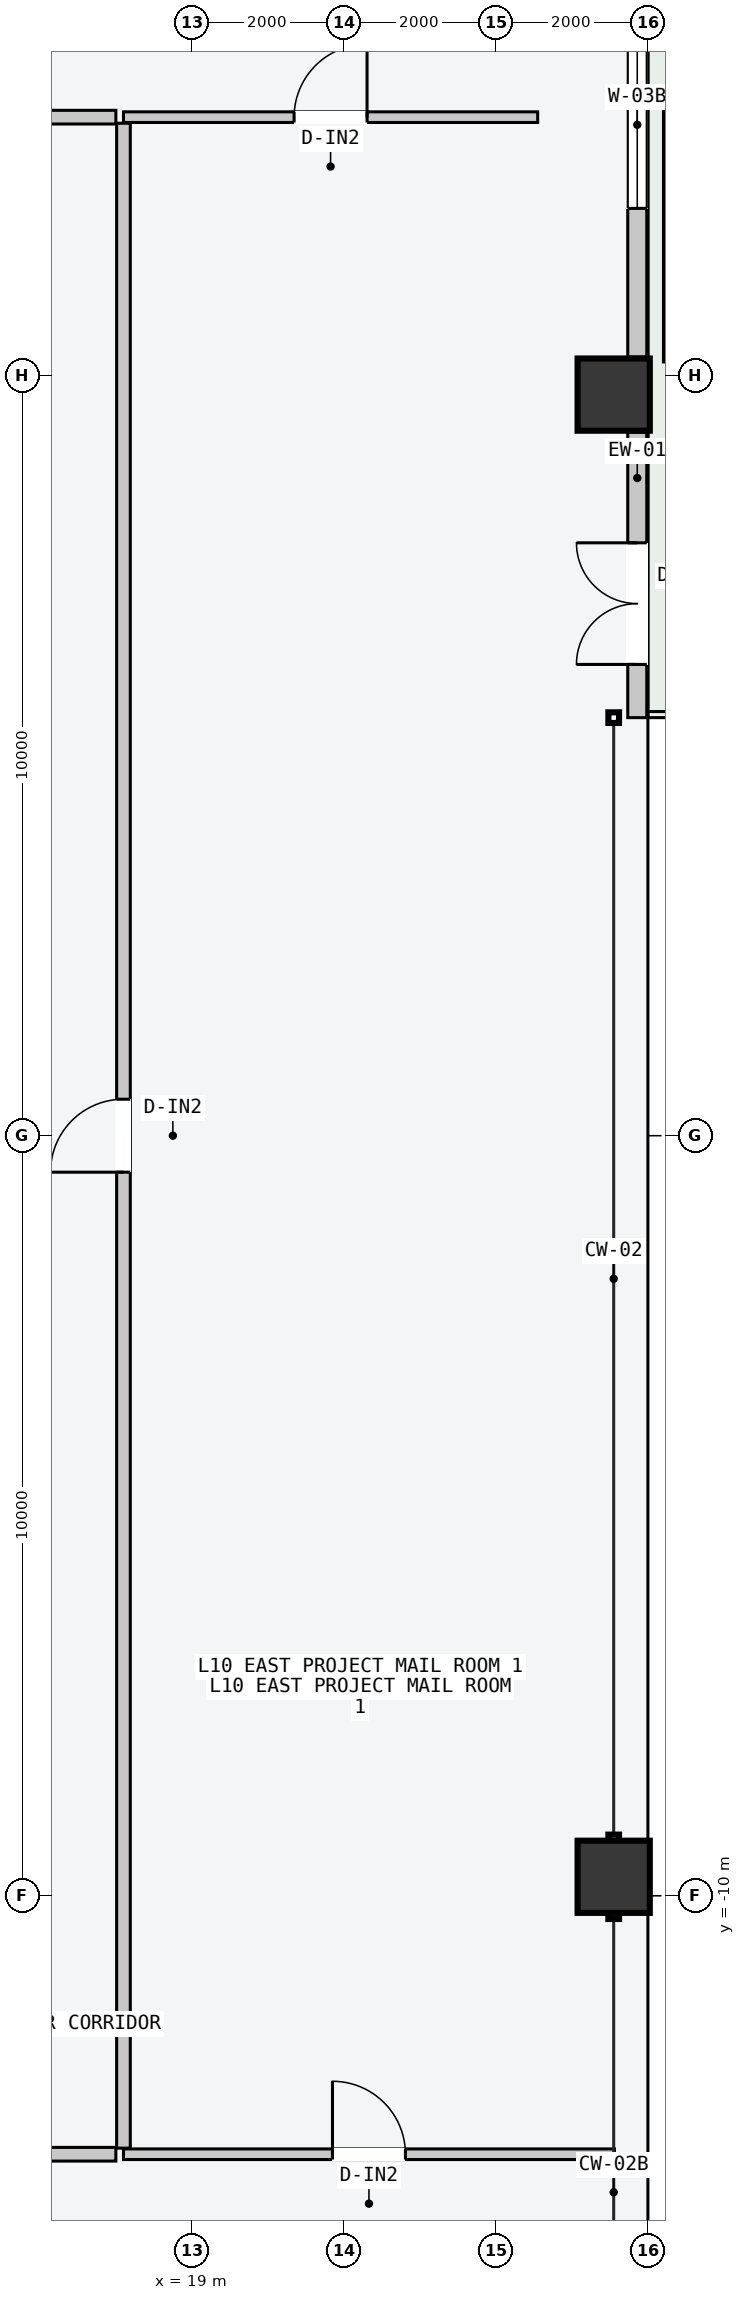
"""IFC4 building model, lengths in metres.
Left out: names, types, materials, properties, quantities, classifications, styles, units other than length and angle.
Written with IfcOpenShell. Run it as: python <this file> out.ifc"""

import sys

from ifc_helpers import new_model, si_unit, direction, frame, frame_2d, origin, origin_2d, place, context, subcontext, project, spatial, rectangle, hollow_rectangle, extrude, element, fill, save


model = new_model("IFC4")
c1 = context("Model", 3, precision=1e-05, world=origin(), true_north=direction((0.0, 1.0)))
c2 = subcontext(c1, "Body", "Model", "MODEL_VIEW")
j1 = project(units=[si_unit("LENGTHUNIT", "METRE"), si_unit("PLANEANGLEUNIT", "RADIAN")], contexts=[c1])
p1 = place(None, origin())
s1 = spatial("IfcSite", under=j1, at=p1, CompositionType="ELEMENT")
p2 = place(p1, origin())
s2 = spatial("IfcBuilding", under=s1, at=p2, CompositionType="ELEMENT")
p3 = place(p2, frame((0.0, 0.0, 42.0)))
s3 = spatial("IfcBuildingStorey", under=s2, at=p3, CompositionType="ELEMENT", Elevation=42.0)
for number, where, z_axis, x_axis in (
    (1, (24.55, -9.75, 0.0), (0.0, 0.0, 1.0), (0.0, 1.0, 0.0)),
    (2, (24.55, 9.75, 0.0), (0.0, 0.0, 1.0), (0.0, 1.0, 0.0)),
):
    element("IfcColumn", number, at=place(p3, frame(where, z_axis=z_axis, x_axis=x_axis)), inside=s3, PredefinedType="COLUMN", context=c2, shape_type="SweptSolid", body=[
        extrude(hollow_rectangle(XDim=0.95, YDim=0.95, WallThickness=0.048, at=origin_2d()), origin(), (0.0, 0.0, 1.0), 3.6),
    ])
p4 = place(p3, frame((24.86, 5.5, 0.0), z_axis=(0.0, 0.0, 1.0), x_axis=(0.0, 1.0, 0.0)))
e3 = element("IfcWall", 3, at=p4, inside=s3, PredefinedType="STANDARD", context=c2, shape_type="SweptSolid", body=[
    extrude(rectangle(XDim=3.755, YDim=0.25, at=frame_2d((1.877, 0.0))), origin(), (0.0, 0.0, 1.0), 3.4),
])
p5 = place(p4, frame((0.7, 0.0, 0.0)))
e4 = element("IfcOpeningElement", 4, at=p5, cuts=e3, PredefinedType="OPENING", context=c2, shape_type="SweptSolid", body=[
    extrude(rectangle(XDim=1.6, YDim=2.2, at=frame_2d((0.8, 1.1))), frame((0.0, 0.135, 0.0), z_axis=(0.0, -1.0, 0.0), x_axis=(1.0, 0.0, 0.0)), (0.0, 0.0, 1.0), 0.27),
])
p6 = place(p3, frame((24.86, 10.245, 0.0), z_axis=(0.0, 0.0, 1.0), x_axis=(0.0, 1.0, 0.0)))
e5 = element("IfcWall", 5, at=p6, inside=s3, PredefinedType="STANDARD", context=c2, shape_type="SweptSolid", body=[
    extrude(rectangle(XDim=7.31, YDim=0.25, at=frame_2d((3.655, 0.0))), origin(), (0.0, 0.0, 1.0), 3.4),
])
p7 = place(p6, frame((1.955, 0.0, 0.85)))
e6 = element("IfcOpeningElement", 6, at=p7, cuts=e5, PredefinedType="OPENING", context=c2, shape_type="SweptSolid", body=[
    extrude(rectangle(XDim=2.2, YDim=2.1, at=frame_2d((1.1, 1.05))), frame((0.0, 0.135, 0.0), z_axis=(0.0, -1.0, 0.0), x_axis=(1.0, 0.0, 0.0)), (0.0, 0.0, 1.0), 0.27),
])
p8 = place(p3, frame((-18.0, 13.4, 0.0), z_axis=(0.0, 0.0, 1.0), x_axis=(1.0, 0.0, 0.0)))
e7 = element("IfcWall", 7, at=p8, inside=s3, PredefinedType="PARTITIONING", context=c2, shape_type="SweptSolid", body=[
    extrude(rectangle(XDim=36.0, YDim=0.18, at=frame_2d((18.0, 0.0))), origin(), (0.0, 0.0, 1.0), 3.4),
])
p9 = place(p8, frame((7.355, 0.0, 0.0)))
e8 = element("IfcOpeningElement", 8, at=p9, cuts=e7, PredefinedType="OPENING", context=c2, shape_type="SweptSolid", body=[
    extrude(rectangle(XDim=0.9, YDim=2.15, at=frame_2d((0.45, 1.075))), frame((0.0, 0.1, 0.0), z_axis=(0.0, -1.0, 0.0), x_axis=(1.0, 0.0, 0.0)), (0.0, 0.0, 1.0), 0.2),
])
p10 = place(p8, frame((21.303, 0.0, 0.0)))
e9 = element("IfcOpeningElement", 9, at=p10, cuts=e7, PredefinedType="OPENING", context=c2, shape_type="SweptSolid", body=[
    extrude(rectangle(XDim=0.96, YDim=2.18, at=frame_2d((0.48, 1.09))), frame((0.0, 0.1, 0.0), z_axis=(0.0, -1.0, 0.0), x_axis=(1.0, 0.0, 0.0)), (0.0, 0.0, 1.0), 0.2),
])
p11 = place(p8, frame((31.468, 0.0, 0.0)))
e10 = element("IfcOpeningElement", 10, at=p11, cuts=e7, PredefinedType="OPENING", context=c2, shape_type="SweptSolid", body=[
    extrude(rectangle(XDim=1.02, YDim=2.2, at=frame_2d((0.51, 1.1))), frame((0.0, 0.1, 0.0), z_axis=(0.0, -1.0, 0.0), x_axis=(1.0, 0.0, 0.0)), (0.0, 0.0, 1.0), 0.2),
])
p12 = place(p3, frame((18.1, 13.4, 0.0), z_axis=(0.0, 0.0, 1.0), x_axis=(1.0, 0.0, 0.0)))
e11 = element("IfcWall", 11, at=p12, inside=s3, PredefinedType="PARTITIONING", context=c2, shape_type="SweptSolid", body=[
    extrude(rectangle(XDim=5.45, YDim=0.14, at=frame_2d((2.725, 0.0))), origin(), (0.0, 0.0, 1.0), 3.4),
])
p13 = place(p12, frame((2.245, 0.0, 0.0)))
e12 = element("IfcOpeningElement", 12, at=p13, cuts=e11, PredefinedType="OPENING", context=c2, shape_type="SweptSolid", body=[
    extrude(rectangle(XDim=0.96, YDim=2.18, at=frame_2d((0.48, 1.09))), frame((0.0, 0.08, 0.0), z_axis=(0.0, -1.0, 0.0), x_axis=(1.0, 0.0, 0.0)), (0.0, 0.0, 1.0), 0.16),
])
p14 = place(p3, frame((-18.0, -13.4, 0.0), z_axis=(0.0, 0.0, 1.0), x_axis=(1.0, 0.0, 0.0)))
e13 = element("IfcWall", 13, at=p14, inside=s3, PredefinedType="PARTITIONING", context=c2, shape_type="SweptSolid", body=[
    extrude(rectangle(XDim=36.0, YDim=0.18, at=frame_2d((18.0, 0.0))), origin(), (0.0, 0.0, 1.0), 3.4),
])
p15 = place(p14, frame((7.205, 0.0, 0.0)))
e14 = element("IfcOpeningElement", 14, at=p15, cuts=e13, PredefinedType="OPENING", context=c2, shape_type="SweptSolid", body=[
    extrude(rectangle(XDim=1.06, YDim=2.2, at=frame_2d((0.53, 1.1))), frame((0.0, 0.1, 0.0), z_axis=(0.0, -1.0, 0.0), x_axis=(1.0, 0.0, 0.0)), (0.0, 0.0, 1.0), 0.2),
])
p16 = place(p14, frame((25.115, 0.0, 0.0)))
e15 = element("IfcOpeningElement", 15, at=p16, cuts=e13, PredefinedType="OPENING", context=c2, shape_type="SweptSolid", body=[
    extrude(rectangle(XDim=1.24, YDim=2.24, at=frame_2d((0.62, 1.12))), frame((0.0, 0.1, 0.0), z_axis=(0.0, -1.0, 0.0), x_axis=(1.0, 0.0, 0.0)), (0.0, 0.0, 1.0), 0.2),
])
p17 = place(p3, frame((18.1, -13.4, 0.0), z_axis=(0.0, 0.0, 1.0), x_axis=(1.0, 0.0, 0.0)))
e16 = element("IfcWall", 16, at=p17, inside=s3, PredefinedType="PARTITIONING", context=c2, shape_type="SweptSolid", body=[
    extrude(rectangle(XDim=6.46, YDim=0.14, at=frame_2d((3.23, 0.0))), origin(), (0.0, 0.0, 1.0), 3.4),
])
p18 = place(p17, frame((2.75, 0.0, 0.0)))
e17 = element("IfcOpeningElement", 17, at=p18, cuts=e16, PredefinedType="OPENING", context=c2, shape_type="SweptSolid", body=[
    extrude(rectangle(XDim=0.96, YDim=2.18, at=frame_2d((0.48, 1.09))), frame((0.0, 0.08, 0.0), z_axis=(0.0, -1.0, 0.0), x_axis=(1.0, 0.0, 0.0)), (0.0, 0.0, 1.0), 0.16),
])
p19 = place(p3, frame((18.1, -13.32, 0.0), z_axis=(0.0, 0.0, 1.0), x_axis=(0.0, 1.0, 0.0)))
e18 = element("IfcWall", 18, at=p19, inside=s3, PredefinedType="PARTITIONING", context=c2, shape_type="SweptSolid", body=[
    extrude(rectangle(XDim=26.64, YDim=0.18, at=frame_2d((13.32, 0.0))), origin(), (0.0, 0.0, 1.0), 3.4),
])
p20 = place(p19, frame((12.84, 0.0, 0.0)))
e19 = element("IfcOpeningElement", 19, at=p20, cuts=e18, PredefinedType="OPENING", context=c2, shape_type="SweptSolid", body=[
    extrude(rectangle(XDim=0.96, YDim=2.18, at=frame_2d((0.48, 1.09))), frame((0.0, 0.1, 0.0), z_axis=(0.0, -1.0, 0.0), x_axis=(1.0, 0.0, 0.0)), (0.0, 0.0, 1.0), 0.2),
])
p21 = place(p5, origin())
e20 = element("IfcDoor", 20, at=p21, inside=s3, OperationType="DOUBLE_DOOR_SINGLE_SWING", PredefinedType="DOOR", context=c2, shape_type="SweptSolid", body=[
    extrude(rectangle(XDim=1.6, YDim=2.2, at=frame_2d((0.8, 1.1))), frame((0.0, 0.025, 0.0), z_axis=(0.0, -1.0, 0.0), x_axis=(1.0, 0.0, 0.0)), (0.0, 0.0, 1.0), 0.05),
])
fill(e4, e20)
p22 = place(p7, origin())
e21 = element("IfcWindow", 21, at=p22, inside=s3, PartitioningType="SINGLE_PANEL", PredefinedType="WINDOW", context=c2, shape_type="SweptSolid", body=[
    extrude(rectangle(XDim=2.2, YDim=2.1, at=frame_2d((1.1, 1.05))), frame((0.0, 0.03, 0.0), z_axis=(0.0, -1.0, 0.0), x_axis=(1.0, 0.0, 0.0)), (0.0, 0.0, 1.0), 0.06),
])
fill(e6, e21)
p23 = place(p13, origin())
e22 = element("IfcDoor", 22, at=p23, inside=s3, OperationType="SINGLE_SWING_RIGHT", PredefinedType="DOOR", context=c2, shape_type="SweptSolid", body=[
    extrude(rectangle(XDim=0.96, YDim=2.18, at=frame_2d((0.48, 1.09))), frame((0.0, 0.025, 0.0), z_axis=(0.0, -1.0, 0.0), x_axis=(1.0, 0.0, 0.0)), (0.0, 0.0, 1.0), 0.05),
])
fill(e12, e22)
p24 = place(p18, origin())
e23 = element("IfcDoor", 23, at=p24, inside=s3, OperationType="SINGLE_SWING_LEFT", PredefinedType="DOOR", context=c2, shape_type="SweptSolid", body=[
    extrude(rectangle(XDim=0.96, YDim=2.18, at=frame_2d((0.48, 1.09))), frame((0.0, 0.025, 0.0), z_axis=(0.0, -1.0, 0.0), x_axis=(1.0, 0.0, 0.0)), (0.0, 0.0, 1.0), 0.05),
])
fill(e17, e23)
p25 = place(p20, origin())
e24 = element("IfcDoor", 24, at=p25, inside=s3, OperationType="SINGLE_SWING_LEFT", PredefinedType="DOOR", context=c2, shape_type="SweptSolid", body=[
    extrude(rectangle(XDim=0.96, YDim=2.18, at=frame_2d((0.48, 1.09))), frame((0.0, 0.025, 0.0), z_axis=(0.0, -1.0, 0.0), x_axis=(1.0, 0.0, 0.0)), (0.0, 0.0, 1.0), 0.05),
])
fill(e19, e24)
save(model, sys.argv[1])
